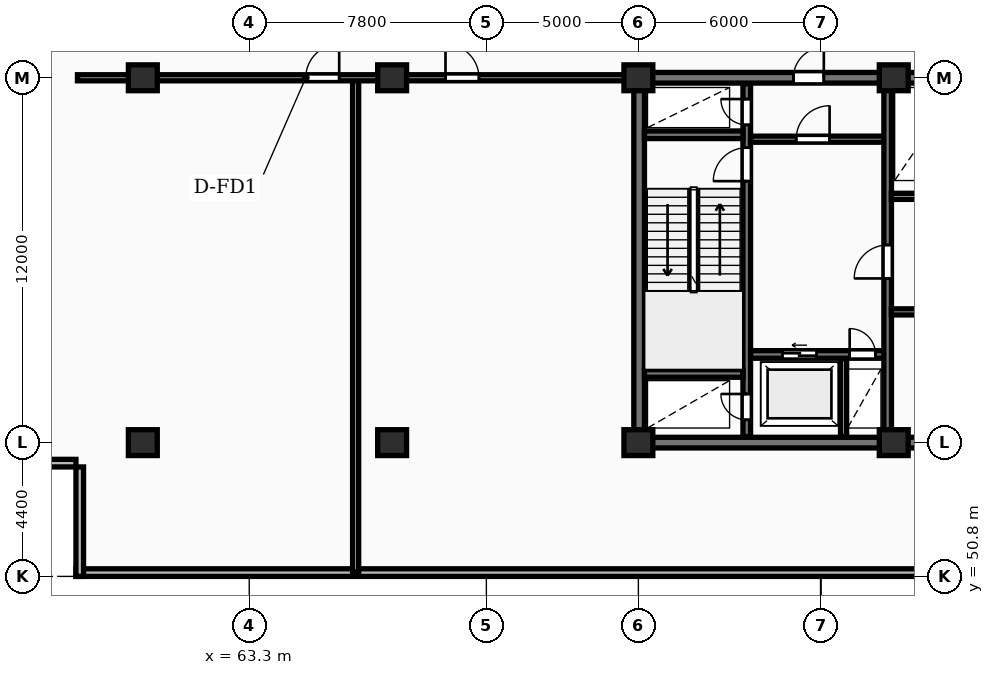
"""IFC4 building model, lengths in metres.
Left out: names, types, materials, properties, quantities, classifications, styles, units other than length and angle.
Written with IfcOpenShell. Run it as: python <this file> out.ifc"""

import sys

from ifc_helpers import new_model, si_unit, direction, frame, frame_2d, origin, origin_2d, place, context, subcontext, project, spatial, rectangle, extrude, element, fill, save


model = new_model("IFC4")
c1 = context("Model", 3, precision=1e-05, world=origin(), true_north=direction((0.0, 1.0)))
c2 = subcontext(c1, "Body", "Model", "MODEL_VIEW")
j1 = project(units=[si_unit("LENGTHUNIT", "METRE"), si_unit("PLANEANGLEUNIT", "RADIAN")], contexts=[c1])
p1 = place(None, origin())
s1 = spatial("IfcSite", under=j1, at=p1, CompositionType="ELEMENT")
p2 = place(p1, origin())
s2 = spatial("IfcBuilding", under=s1, at=p2, CompositionType="ELEMENT")
p3 = place(p2, frame((0.0, 0.0, 157.3)))
s3 = spatial("IfcBuildingStorey", under=s2, at=p3, CompositionType="ELEMENT", Elevation=157.3)
for number, where, z_axis, x_axis in (
    (1, (59.8, 55.2, 0.0), (0.0, 0.0, 1.0), (1.0, 0.0, 0.0)),
    (2, (59.8, 67.2, 0.0), (0.0, 0.0, 1.0), (1.0, 0.0, 0.0)),
    (3, (68.0, 55.2, 0.0), (0.0, 0.0, 1.0), (1.0, 0.0, 0.0)),
    (4, (68.0, 67.2, 0.0), (0.0, 0.0, 1.0), (1.0, 0.0, 0.0)),
    (5, (76.1, 55.2, 0.0), (0.0, 0.0, 1.0), (1.0, 0.0, 0.0)),
    (6, (76.1, 67.2, 0.0), (0.0, 0.0, 1.0), (1.0, 0.0, 0.0)),
    (7, (84.5, 55.2, 0.0), (0.0, 0.0, 1.0), (1.0, 0.0, 0.0)),
    (8, (84.5, 67.2, 0.0), (0.0, 0.0, 1.0), (1.0, 0.0, 0.0)),
):
    element("IfcColumn", number, at=place(p3, frame(where, z_axis=z_axis, x_axis=x_axis)), inside=s3, PredefinedType="COLUMN", context=c2, shape_type="SweptSolid", body=[
        extrude(rectangle(XDim=0.95, YDim=0.85, at=origin_2d()), origin(), (0.0, 0.0, 1.0), 4.8),
    ])
p4 = place(p3, frame((57.6, 50.925, 0.0), z_axis=(0.0, 0.0, 1.0), x_axis=(1.0, 0.0, 0.0)))
e9 = element("IfcWall", 9, at=p4, inside=s3, PredefinedType="SHEAR", context=c2, shape_type="SweptSolid", body=[
    extrude(rectangle(XDim=73.0, YDim=0.25, at=frame_2d((36.5, 0.0))), origin(), (0.0, 0.0, 1.0), 4.48),
])
p5 = place(p3, frame((54.0, 54.525, 0.0), z_axis=(0.0, 0.0, 1.0), x_axis=(1.0, 0.0, 0.0)))
e10 = element("IfcWall", 10, at=p5, inside=s3, PredefinedType="SHEAR", context=c2, shape_type="SweptSolid", body=[
    extrude(rectangle(XDim=3.6, YDim=0.25, at=frame_2d((1.8, 0.0))), origin(), (0.0, 0.0, 1.0), 4.48),
])
p6 = place(p3, frame((57.725, 54.4, 0.0), z_axis=(0.0, 0.0, 1.0), x_axis=(0.0, -1.0, 0.0)))
e11 = element("IfcWall", 11, at=p6, inside=s3, PredefinedType="SHEAR", context=c2, shape_type="SweptSolid", body=[
    extrude(rectangle(XDim=3.6, YDim=0.25, at=frame_2d((1.8, 0.0))), origin(), (0.0, 0.0, 1.0), 4.48),
])
p7 = place(p3, frame((75.95, 55.2, 0.0), z_axis=(0.0, 0.0, 1.0), x_axis=(1.0, 0.0, 0.0)))
e12 = element("IfcWall", 12, at=p7, inside=s3, PredefinedType="SHEAR", context=c2, shape_type="SweptSolid", body=[
    extrude(rectangle(XDim=36.3, YDim=0.35, at=frame_2d((18.15, 0.0))), origin(), (0.0, 0.0, 1.0), 4.8),
])
p8 = place(p3, frame((76.125, 55.375, 0.0), z_axis=(0.0, 0.0, 1.0), x_axis=(0.0, 1.0, 0.0)))
e13 = element("IfcWall", 13, at=p8, inside=s3, PredefinedType="SHEAR", context=c2, shape_type="SweptSolid", body=[
    extrude(rectangle(XDim=11.65, YDim=0.35, at=frame_2d((5.825, 0.0))), origin(), (0.0, 0.0, 1.0), 4.8),
])
p9 = place(p3, frame((75.95, 67.2, 0.0), z_axis=(0.0, 0.0, 1.0), x_axis=(1.0, 0.0, 0.0)))
e14 = element("IfcWall", 14, at=p9, inside=s3, PredefinedType="SHEAR", context=c2, shape_type="SweptSolid", body=[
    extrude(rectangle(XDim=36.3, YDim=0.35, at=frame_2d((18.15, 0.0))), origin(), (0.0, 0.0, 1.0), 4.8),
])
p10 = place(p9, frame((5.25, 0.0, 0.0)))
e15 = element("IfcOpeningElement", 15, at=p10, cuts=e14, PredefinedType="OPENING", context=c2, shape_type="SweptSolid", body=[
    extrude(rectangle(XDim=1.0, YDim=2.15, at=frame_2d((0.5, 1.075))), frame((0.0, 0.185, 0.0), z_axis=(0.0, -1.0, 0.0), x_axis=(1.0, 0.0, 0.0)), (0.0, 0.0, 1.0), 0.37),
])
p11 = place(p9, frame((21.6, 0.0, 0.0)))
e16 = element("IfcOpeningElement", 16, at=p11, cuts=e14, PredefinedType="OPENING", context=c2, shape_type="SweptSolid", body=[
    extrude(rectangle(XDim=1.5, YDim=2.2, at=frame_2d((0.75, 1.1))), frame((0.0, 0.185, 0.0), z_axis=(0.0, -1.0, 0.0), x_axis=(1.0, 0.0, 0.0)), (0.0, 0.0, 1.0), 0.37),
])
p12 = place(p9, frame((30.45, 0.0, 0.0)))
e17 = element("IfcOpeningElement", 17, at=p12, cuts=e14, PredefinedType="OPENING", context=c2, shape_type="SweptSolid", body=[
    extrude(rectangle(XDim=1.0, YDim=2.15, at=frame_2d((0.5, 1.075))), frame((0.0, 0.185, 0.0), z_axis=(0.0, -1.0, 0.0), x_axis=(1.0, 0.0, 0.0)), (0.0, 0.0, 1.0), 0.37),
])
p13 = place(p3, frame((79.665, 55.4, 0.0), z_axis=(0.0, 0.0, 1.0), x_axis=(0.0, 1.0, 0.0)))
e18 = element("IfcWall", 18, at=p13, inside=s3, PredefinedType="SHEAR", context=c2, shape_type="SweptSolid", body=[
    extrude(rectangle(XDim=11.6, YDim=0.25, at=frame_2d((5.8, 0.0))), origin(), (0.0, 0.0, 1.0), 4.8),
])
p14 = place(p13, frame((0.55, 0.0, 0.0)))
e19 = element("IfcOpeningElement", 19, at=p14, cuts=e18, PredefinedType="OPENING", context=c2, shape_type="SweptSolid", body=[
    extrude(rectangle(XDim=0.85, YDim=2.05, at=frame_2d((0.425, 1.025))), frame((0.0, 0.135, 0.0), z_axis=(0.0, -1.0, 0.0), x_axis=(1.0, 0.0, 0.0)), (0.0, 0.0, 1.0), 0.27),
])
p15 = place(p13, frame((8.4, 0.0, 0.0)))
e20 = element("IfcOpeningElement", 20, at=p15, cuts=e18, PredefinedType="OPENING", context=c2, shape_type="SweptSolid", body=[
    extrude(rectangle(XDim=1.1, YDim=2.1, at=frame_2d((0.55, 1.05))), frame((0.0, 0.135, 0.0), z_axis=(0.0, -1.0, 0.0), x_axis=(1.0, 0.0, 0.0)), (0.0, 0.0, 1.0), 0.27),
])
p16 = place(p13, frame((10.25, 0.0, 0.0)))
e21 = element("IfcOpeningElement", 21, at=p16, cuts=e18, PredefinedType="OPENING", context=c2, shape_type="SweptSolid", body=[
    extrude(rectangle(XDim=0.85, YDim=2.05, at=frame_2d((0.425, 1.025))), frame((0.0, 0.135, 0.0), z_axis=(0.0, -1.0, 0.0), x_axis=(1.0, 0.0, 0.0)), (0.0, 0.0, 1.0), 0.27),
])
for number, where, z_axis, x_axis in (
    (22, (76.3, 57.475, 0.0), (0.0, 0.0, 1.0), (1.0, 0.0, 0.0)),
    (23, (76.3, 65.325, 0.0), (0.0, 0.0, 1.0), (1.0, 0.0, 0.0)),
):
    element("IfcWall", number, at=place(p3, frame(where, z_axis=z_axis, x_axis=x_axis)), inside=s3, PredefinedType="SHEAR", context=c2, shape_type="SweptSolid", body=[
        extrude(rectangle(XDim=3.24, YDim=0.25, at=frame_2d((1.62, 0.0))), origin(), (0.0, 0.0, 1.0), 4.8),
    ])
p17 = place(p3, frame((79.79, 58.1, 0.0), z_axis=(0.0, 0.0, 1.0), x_axis=(1.0, 0.0, 0.0)))
e24 = element("IfcWall", 24, at=p17, inside=s3, PredefinedType="SHEAR", context=c2, shape_type="SweptSolid", body=[
    extrude(rectangle(XDim=4.39, YDim=0.25, at=frame_2d((2.195, 0.0))), origin(), (0.0, 0.0, 1.0), 4.8),
])
p18 = place(p17, frame((1.05, 0.0, 0.0)))
e25 = element("IfcOpeningElement", 25, at=p18, cuts=e24, PredefinedType="OPENING", context=c2, shape_type="SweptSolid", body=[
    extrude(rectangle(XDim=1.12, YDim=2.12, at=frame_2d((0.56, 1.06))), frame((0.0, 0.135, 0.0), z_axis=(0.0, -1.0, 0.0), x_axis=(1.0, 0.0, 0.0)), (0.0, 0.0, 1.0), 0.27),
])
p19 = place(p17, frame((3.26, 0.0, 0.0)))
e26 = element("IfcOpeningElement", 26, at=p19, cuts=e24, PredefinedType="OPENING", context=c2, shape_type="SweptSolid", body=[
    extrude(rectangle(XDim=0.85, YDim=2.05, at=frame_2d((0.425, 1.025))), frame((0.0, 0.135, 0.0), z_axis=(0.0, -1.0, 0.0), x_axis=(1.0, 0.0, 0.0)), (0.0, 0.0, 1.0), 0.27),
])
p20 = place(p3, frame((82.85, 55.4, 0.0), z_axis=(0.0, 0.0, 1.0), x_axis=(0.0, 1.0, 0.0)))
e27 = element("IfcWall", 27, at=p20, inside=s3, PredefinedType="PARTITIONING", context=c2, shape_type="SweptSolid", body=[
    extrude(rectangle(XDim=2.56, YDim=0.2, at=frame_2d((1.28, 0.0))), origin(), (0.0, 0.0, 1.0), 4.48),
])
p21 = place(p3, frame((79.79, 65.18, 0.0), z_axis=(0.0, 0.0, 1.0), x_axis=(1.0, 0.0, 0.0)))
e28 = element("IfcWall", 28, at=p21, inside=s3, PredefinedType="PARTITIONING", context=c2, shape_type="SweptSolid", body=[
    extrude(rectangle(XDim=4.39, YDim=0.2, at=frame_2d((2.195, 0.0))), origin(), (0.0, 0.0, 1.0), 4.48),
])
p22 = place(p21, frame((1.5, 0.0, 0.0)))
e29 = element("IfcOpeningElement", 29, at=p22, cuts=e28, PredefinedType="OPENING", context=c2, shape_type="SweptSolid", body=[
    extrude(rectangle(XDim=1.1, YDim=2.1, at=frame_2d((0.55, 1.05))), frame((0.0, 0.11, 0.0), z_axis=(0.0, -1.0, 0.0), x_axis=(1.0, 0.0, 0.0)), (0.0, 0.0, 1.0), 0.22),
])
p23 = place(p3, frame((84.3, 55.4, 0.0), z_axis=(0.0, 0.0, 1.0), x_axis=(0.0, 1.0, 0.0)))
e30 = element("IfcWall", 30, at=p23, inside=s3, PredefinedType="SHEAR", context=c2, shape_type="SweptSolid", body=[
    extrude(rectangle(XDim=11.6, YDim=0.25, at=frame_2d((5.8, 0.0))), origin(), (0.0, 0.0, 1.0), 4.8),
])
p24 = place(p23, frame((5.2, 0.0, 0.0)))
e31 = element("IfcOpeningElement", 31, at=p24, cuts=e30, PredefinedType="OPENING", context=c2, shape_type="SweptSolid", body=[
    extrude(rectangle(XDim=1.1, YDim=2.1, at=frame_2d((0.55, 1.05))), frame((0.0, 0.135, 0.0), z_axis=(0.0, -1.0, 0.0), x_axis=(1.0, 0.0, 0.0)), (0.0, 0.0, 1.0), 0.27),
])
p25 = place(p3, frame((84.42, 59.5, 0.0), z_axis=(0.0, 0.0, 1.0), x_axis=(1.0, 0.0, 0.0)))
e32 = element("IfcWall", 32, at=p25, inside=s3, PredefinedType="PARTITIONING", context=c2, shape_type="SweptSolid", body=[
    extrude(rectangle(XDim=8.36, YDim=0.2, at=frame_2d((4.18, 0.0))), origin(), (0.0, 0.0, 1.0), 4.48),
])
p26 = place(p25, frame((3.4, 0.0, 0.0)))
e33 = element("IfcOpeningElement", 33, at=p26, cuts=e32, PredefinedType="OPENING", context=c2, shape_type="SweptSolid", body=[
    extrude(rectangle(XDim=0.92, YDim=2.08, at=frame_2d((0.46, 1.04))), frame((0.0, 0.11, 0.0), z_axis=(0.0, -1.0, 0.0), x_axis=(1.0, 0.0, 0.0)), (0.0, 0.0, 1.0), 0.22),
])
p27 = place(p3, frame((84.42, 63.3, 0.0), z_axis=(0.0, 0.0, 1.0), x_axis=(1.0, 0.0, 0.0)))
e34 = element("IfcWall", 34, at=p27, inside=s3, PredefinedType="PARTITIONING", context=c2, shape_type="SweptSolid", body=[
    extrude(rectangle(XDim=19.83, YDim=0.2, at=frame_2d((9.915, 0.0))), origin(), (0.0, 0.0, 1.0), 4.48),
])
p28 = place(p27, frame((1.15, 0.0, 0.0)))
e35 = element("IfcOpeningElement", 35, at=p28, cuts=e34, PredefinedType="OPENING", context=c2, shape_type="SweptSolid", body=[
    extrude(rectangle(XDim=0.85, YDim=2.05, at=frame_2d((0.425, 1.025))), frame((0.0, 0.11, 0.0), z_axis=(0.0, -1.0, 0.0), x_axis=(1.0, 0.0, 0.0)), (0.0, 0.0, 1.0), 0.22),
])
p29 = place(p27, frame((3.25, 0.0, 0.0)))
e36 = element("IfcOpeningElement", 36, at=p29, cuts=e34, PredefinedType="OPENING", context=c2, shape_type="SweptSolid", body=[
    extrude(rectangle(XDim=0.85, YDim=2.05, at=frame_2d((0.425, 1.025))), frame((0.0, 0.11, 0.0), z_axis=(0.0, -1.0, 0.0), x_axis=(1.0, 0.0, 0.0)), (0.0, 0.0, 1.0), 0.22),
])
p30 = place(p27, frame((13.08, 0.0, 0.0)))
e37 = element("IfcOpeningElement", 37, at=p30, cuts=e34, PredefinedType="OPENING", context=c2, shape_type="SweptSolid", body=[
    extrude(rectangle(XDim=1.5, YDim=2.2, at=frame_2d((0.75, 1.1))), frame((0.0, 0.11, 0.0), z_axis=(0.0, -1.0, 0.0), x_axis=(1.0, 0.0, 0.0)), (0.0, 0.0, 1.0), 0.22),
])
p31 = place(p27, frame((6.78, 0.0, 0.0)))
e38 = element("IfcOpeningElement", 38, at=p31, cuts=e34, PredefinedType="OPENING", context=c2, shape_type="SweptSolid", body=[
    extrude(rectangle(XDim=0.92, YDim=2.08, at=frame_2d((0.46, 1.04))), frame((0.0, 0.11, 0.0), z_axis=(0.0, -1.0, 0.0), x_axis=(1.0, 0.0, 0.0)), (0.0, 0.0, 1.0), 0.22),
])
p32 = place(p27, frame((16.28, 0.0, 0.0)))
e39 = element("IfcOpeningElement", 39, at=p32, cuts=e34, PredefinedType="OPENING", context=c2, shape_type="SweptSolid", body=[
    extrude(rectangle(XDim=0.92, YDim=2.08, at=frame_2d((0.46, 1.04))), frame((0.0, 0.11, 0.0), z_axis=(0.0, -1.0, 0.0), x_axis=(1.0, 0.0, 0.0)), (0.0, 0.0, 1.0), 0.22),
])
p33 = place(p3, frame((66.8, 50.95, 0.0), z_axis=(0.0, 0.0, 1.0), x_axis=(0.0, 1.0, 0.0)))
e40 = element("IfcWall", 40, at=p33, inside=s3, PredefinedType="PARTITIONING", context=c2, shape_type="SweptSolid", body=[
    extrude(rectangle(XDim=16.2, YDim=0.2, at=frame_2d((8.1, 0.0))), origin(), (0.0, 0.0, 1.0), 4.48),
])
p34 = place(p3, frame((57.65, 67.2, 0.0), z_axis=(0.0, 0.0, 1.0), x_axis=(1.0, 0.0, 0.0)))
e41 = element("IfcWall", 41, at=p34, inside=s3, PredefinedType="PARTITIONING", context=c2, shape_type="SweptSolid", body=[
    extrude(rectangle(XDim=18.3, YDim=0.2, at=frame_2d((9.15, 0.0))), origin(), (0.0, 0.0, 1.0), 3.23),
])
p35 = place(p34, frame((7.509, 0.0, 0.0)))
e42 = element("IfcOpeningElement", 42, at=p35, cuts=e41, PredefinedType="OPENING", context=c2, shape_type="SweptSolid", body=[
    extrude(rectangle(XDim=1.1, YDim=2.1, at=frame_2d((0.55, 1.05))), frame((0.0, 0.11, 0.0), z_axis=(0.0, -1.0, 0.0), x_axis=(1.0, 0.0, 0.0)), (0.0, 0.0, 1.0), 0.22),
])
p36 = place(p34, frame((12.106, 0.0, 0.0)))
e43 = element("IfcOpeningElement", 43, at=p36, cuts=e41, PredefinedType="OPENING", context=c2, shape_type="SweptSolid", body=[
    extrude(rectangle(XDim=1.1, YDim=2.1, at=frame_2d((0.55, 1.05))), frame((0.0, 0.11, 0.0), z_axis=(0.0, -1.0, 0.0), x_axis=(1.0, 0.0, 0.0)), (0.0, 0.0, 1.0), 0.22),
])
p37 = place(p10, origin())
e44 = element("IfcDoor", 44, at=p37, inside=s3, OperationType="SINGLE_SWING_RIGHT", PredefinedType="DOOR", context=c2, shape_type="SweptSolid", body=[
    extrude(rectangle(XDim=1.0, YDim=2.15, at=frame_2d((0.5, 1.075))), frame((0.0, 0.025, 0.0), z_axis=(0.0, -1.0, 0.0), x_axis=(1.0, 0.0, 0.0)), (0.0, 0.0, 1.0), 0.05),
])
fill(e15, e44)
p38 = place(p14, origin())
e45 = element("IfcDoor", 45, at=p38, inside=s3, OperationType="SINGLE_SWING_RIGHT", PredefinedType="DOOR", context=c2, shape_type="SweptSolid", body=[
    extrude(rectangle(XDim=0.85, YDim=2.05, at=frame_2d((0.425, 1.025))), frame((0.0, 0.025, 0.0), z_axis=(0.0, -1.0, 0.0), x_axis=(1.0, 0.0, 0.0)), (0.0, 0.0, 1.0), 0.05),
])
fill(e19, e45)
p39 = place(p15, origin())
e46 = element("IfcDoor", 46, at=p39, inside=s3, OperationType="SINGLE_SWING_LEFT", PredefinedType="DOOR", context=c2, shape_type="SweptSolid", body=[
    extrude(rectangle(XDim=1.1, YDim=2.1, at=frame_2d((0.55, 1.05))), frame((0.0, 0.025, 0.0), z_axis=(0.0, -1.0, 0.0), x_axis=(1.0, 0.0, 0.0)), (0.0, 0.0, 1.0), 0.05),
])
fill(e20, e46)
p40 = place(p16, origin())
e47 = element("IfcDoor", 47, at=p40, inside=s3, OperationType="SINGLE_SWING_RIGHT", PredefinedType="DOOR", context=c2, shape_type="SweptSolid", body=[
    extrude(rectangle(XDim=0.85, YDim=2.05, at=frame_2d((0.425, 1.025))), frame((0.0, 0.025, 0.0), z_axis=(0.0, -1.0, 0.0), x_axis=(1.0, 0.0, 0.0)), (0.0, 0.0, 1.0), 0.05),
])
fill(e21, e47)
p41 = place(p18, origin())
e48 = element("IfcDoor", 48, at=p41, inside=s3, OperationType="SLIDING_TO_LEFT", PredefinedType="DOOR", context=c2, shape_type="SweptSolid", body=[
    extrude(rectangle(XDim=1.12, YDim=2.12, at=frame_2d((0.56, 1.06))), frame((0.0, 0.025, 0.0), z_axis=(0.0, -1.0, 0.0), x_axis=(1.0, 0.0, 0.0)), (0.0, 0.0, 1.0), 0.05),
])
fill(e25, e48)
p42 = place(p19, origin())
e49 = element("IfcDoor", 49, at=p42, inside=s3, OperationType="SINGLE_SWING_LEFT", PredefinedType="DOOR", context=c2, shape_type="SweptSolid", body=[
    extrude(rectangle(XDim=0.85, YDim=2.05, at=frame_2d((0.425, 1.025))), frame((0.0, 0.025, 0.0), z_axis=(0.0, -1.0, 0.0), x_axis=(1.0, 0.0, 0.0)), (0.0, 0.0, 1.0), 0.05),
])
fill(e26, e49)
p43 = place(p22, origin())
e50 = element("IfcDoor", 50, at=p43, inside=s3, OperationType="SINGLE_SWING_RIGHT", PredefinedType="DOOR", context=c2, shape_type="SweptSolid", body=[
    extrude(rectangle(XDim=1.1, YDim=2.1, at=frame_2d((0.55, 1.05))), frame((0.0, 0.025, 0.0), z_axis=(0.0, -1.0, 0.0), x_axis=(1.0, 0.0, 0.0)), (0.0, 0.0, 1.0), 0.05),
])
fill(e29, e50)
p44 = place(p24, origin())
e51 = element("IfcDoor", 51, at=p44, inside=s3, OperationType="SINGLE_SWING_LEFT", PredefinedType="DOOR", context=c2, shape_type="SweptSolid", body=[
    extrude(rectangle(XDim=1.1, YDim=2.1, at=frame_2d((0.55, 1.05))), frame((0.0, 0.025, 0.0), z_axis=(0.0, -1.0, 0.0), x_axis=(1.0, 0.0, 0.0)), (0.0, 0.0, 1.0), 0.05),
])
fill(e31, e51)
p45 = place(p35, origin())
e52 = element("IfcDoor", 52, at=p45, inside=s3, OperationType="SINGLE_SWING_RIGHT", PredefinedType="DOOR", context=c2, shape_type="SweptSolid", body=[
    extrude(rectangle(XDim=1.1, YDim=2.1, at=frame_2d((0.55, 1.05))), frame((0.0, 0.025, 0.0), z_axis=(0.0, -1.0, 0.0), x_axis=(1.0, 0.0, 0.0)), (0.0, 0.0, 1.0), 0.05),
])
fill(e42, e52)
p46 = place(p36, origin())
e53 = element("IfcDoor", 53, at=p46, inside=s3, OperationType="SINGLE_SWING_LEFT", PredefinedType="DOOR", context=c2, shape_type="SweptSolid", body=[
    extrude(rectangle(XDim=1.1, YDim=2.1, at=frame_2d((0.55, 1.05))), frame((0.0, 0.025, 0.0), z_axis=(0.0, -1.0, 0.0), x_axis=(1.0, 0.0, 0.0)), (0.0, 0.0, 1.0), 0.05),
])
fill(e43, e53)
save(model, sys.argv[1])
